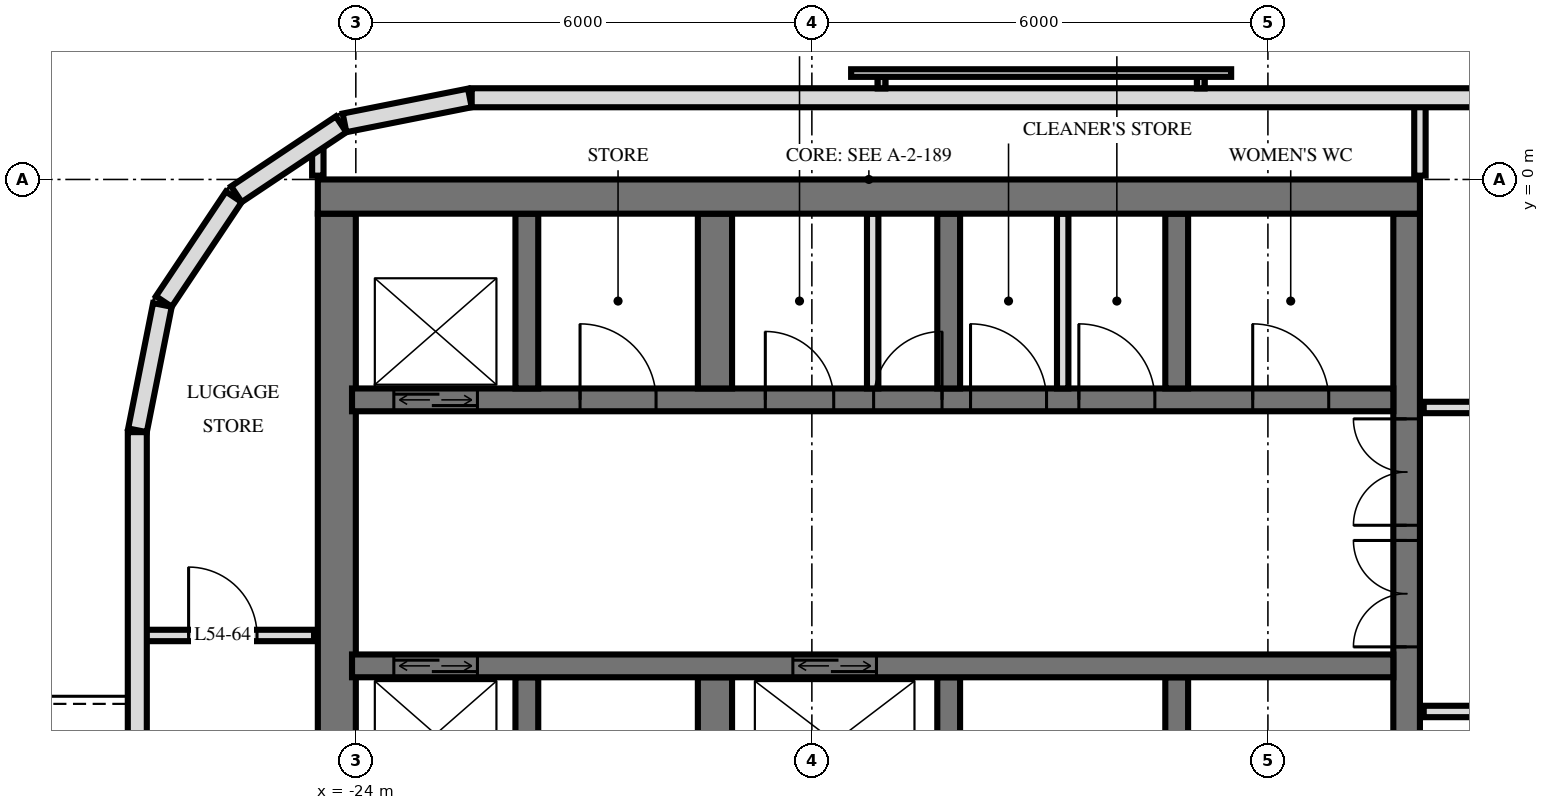
"""IFC4 building model, lengths in metres.
Left out: names, types, materials, properties, quantities, classifications, styles, units other than length and angle.
Written with IfcOpenShell. Run it as: python <this file> out.ifc"""

import sys

from ifc_helpers import new_model, si_unit, direction, frame, frame_2d, origin, place, context, subcontext, project, spatial, rectangle, extrude, element, fill, save


model = new_model("IFC4")
c1 = context("Model", 3, precision=1e-05, world=origin(), true_north=direction((0.0, 1.0)))
c2 = subcontext(c1, "Body", "Model", "MODEL_VIEW")
j1 = project(units=[si_unit("LENGTHUNIT", "METRE"), si_unit("PLANEANGLEUNIT", "RADIAN")], contexts=[c1])
p1 = place(None, origin())
s1 = spatial("IfcSite", under=j1, at=p1, CompositionType="ELEMENT")
p2 = place(p1, origin())
s2 = spatial("IfcBuilding", under=s1, at=p2, CompositionType="ELEMENT")
p3 = place(p2, frame((0.0, 0.0, 208.1)))
s3 = spatial("IfcBuildingStorey", under=s2, at=p3, CompositionType="ELEMENT", Elevation=208.1)
p4 = place(p3, frame((-24.5, -0.225, 0.0), z_axis=(0.0, 0.0, 1.0), x_axis=(1.0, 0.0, 0.0)))
e1 = element("IfcWall", 1, at=p4, inside=s3, PredefinedType="SHEAR", context=c2, shape_type="SweptSolid", body=[
    extrude(rectangle(XDim=14.5, YDim=0.45, at=frame_2d((7.25, 0.0))), origin(), (0.0, 0.0, 1.0), 3.5),
])
p5 = place(p3, frame((-10.175, -14.55, 0.0), z_axis=(0.0, 0.0, 1.0), x_axis=(0.0, 1.0, 0.0)))
e2 = element("IfcWall", 2, at=p5, inside=s3, PredefinedType="SHEAR", context=c2, shape_type="SweptSolid", body=[
    extrude(rectangle(XDim=14.1, YDim=0.35, at=frame_2d((7.05, 0.0))), origin(), (0.0, 0.0, 1.0), 3.5),
])
p6 = place(p5, frame((8.4, 0.0, 0.0)))
e3 = element("IfcOpeningElement", 3, at=p6, cuts=e2, PredefinedType="OPENING", context=c2, shape_type="SweptSolid", body=[
    extrude(rectangle(XDim=1.4, YDim=2.4, at=frame_2d((0.7, 1.2))), frame((0.0, 0.185, 0.0), z_axis=(0.0, -1.0, 0.0), x_axis=(1.0, 0.0, 0.0)), (0.0, 0.0, 1.0), 0.37),
])
p7 = place(p5, frame((10.0, 0.0, 0.0)))
e4 = element("IfcOpeningElement", 4, at=p7, cuts=e2, PredefinedType="OPENING", context=c2, shape_type="SweptSolid", body=[
    extrude(rectangle(XDim=1.4, YDim=2.4, at=frame_2d((0.7, 1.2))), frame((0.0, 0.185, 0.0), z_axis=(0.0, -1.0, 0.0), x_axis=(1.0, 0.0, 0.0)), (0.0, 0.0, 1.0), 0.37),
])
p8 = place(p5, frame((4.0, 0.0, 0.0)))
e5 = element("IfcOpeningElement", 5, at=p8, cuts=e2, PredefinedType="OPENING", context=c2, shape_type="SweptSolid", body=[
    extrude(rectangle(XDim=1.2, YDim=2.1, at=frame_2d((0.6, 1.05))), frame((0.0, 0.185, 0.0), z_axis=(0.0, -1.0, 0.0), x_axis=(1.0, 0.0, 0.0)), (0.0, 0.0, 1.0), 0.37),
])
p9 = place(p3, frame((-24.25, -14.55, 0.0), z_axis=(0.0, 0.0, 1.0), x_axis=(0.0, 1.0, 0.0)))
e6 = element("IfcWall", 6, at=p9, inside=s3, PredefinedType="SHEAR", context=c2, shape_type="SweptSolid", body=[
    extrude(rectangle(XDim=14.1, YDim=0.5, at=frame_2d((7.05, 0.0))), origin(), (0.0, 0.0, 1.0), 3.5),
])
p10 = place(p3, frame((-24.05, -2.9, 0.0), z_axis=(0.0, 0.0, 1.0), x_axis=(1.0, 0.0, 0.0)))
e7 = element("IfcWall", 7, at=p10, inside=s3, PredefinedType="SHEAR", context=c2, shape_type="SweptSolid", body=[
    extrude(rectangle(XDim=13.7, YDim=0.3, at=frame_2d((6.85, 0.0))), origin(), (0.0, 0.0, 1.0), 3.5),
])
p11 = place(p10, frame((0.55, 0.0, 0.0)))
e8 = element("IfcOpeningElement", 8, at=p11, cuts=e7, PredefinedType="OPENING", context=c2, shape_type="SweptSolid", body=[
    extrude(rectangle(XDim=1.1, YDim=2.1, at=frame_2d((0.55, 1.05))), frame((0.0, 0.16, 0.0), z_axis=(0.0, -1.0, 0.0), x_axis=(1.0, 0.0, 0.0)), (0.0, 0.0, 1.0), 0.32),
])
p12 = place(p10, frame((6.863, 0.0, 0.0)))
e9 = element("IfcOpeningElement", 9, at=p12, cuts=e7, PredefinedType="OPENING", context=c2, shape_type="SweptSolid", body=[
    extrude(rectangle(XDim=0.9, YDim=2.1, at=frame_2d((0.45, 1.05))), frame((0.0, 0.16, 0.0), z_axis=(0.0, -1.0, 0.0), x_axis=(1.0, 0.0, 0.0)), (0.0, 0.0, 1.0), 0.32),
])
p13 = place(p10, frame((5.438, 0.0, 0.0)))
e10 = element("IfcOpeningElement", 10, at=p13, cuts=e7, PredefinedType="OPENING", context=c2, shape_type="SweptSolid", body=[
    extrude(rectangle(XDim=0.9, YDim=2.1, at=frame_2d((0.45, 1.05))), frame((0.0, 0.16, 0.0), z_axis=(0.0, -1.0, 0.0), x_axis=(1.0, 0.0, 0.0)), (0.0, 0.0, 1.0), 0.32),
])
p14 = place(p10, frame((11.85, 0.0, 0.0)))
e11 = element("IfcOpeningElement", 11, at=p14, cuts=e7, PredefinedType="OPENING", context=c2, shape_type="SweptSolid", body=[
    extrude(rectangle(XDim=1.0, YDim=2.1, at=frame_2d((0.5, 1.05))), frame((0.0, 0.16, 0.0), z_axis=(0.0, -1.0, 0.0), x_axis=(1.0, 0.0, 0.0)), (0.0, 0.0, 1.0), 0.32),
])
p15 = place(p10, frame((9.562, 0.0, 0.0)))
e12 = element("IfcOpeningElement", 12, at=p15, cuts=e7, PredefinedType="OPENING", context=c2, shape_type="SweptSolid", body=[
    extrude(rectangle(XDim=1.0, YDim=2.1, at=frame_2d((0.5, 1.05))), frame((0.0, 0.16, 0.0), z_axis=(0.0, -1.0, 0.0), x_axis=(1.0, 0.0, 0.0)), (0.0, 0.0, 1.0), 0.32),
])
p16 = place(p10, frame((8.137, 0.0, 0.0)))
e13 = element("IfcOpeningElement", 13, at=p16, cuts=e7, PredefinedType="OPENING", context=c2, shape_type="SweptSolid", body=[
    extrude(rectangle(XDim=1.0, YDim=2.1, at=frame_2d((0.5, 1.05))), frame((0.0, 0.16, 0.0), z_axis=(0.0, -1.0, 0.0), x_axis=(1.0, 0.0, 0.0)), (0.0, 0.0, 1.0), 0.32),
])
p17 = place(p10, frame((3.0, 0.0, 0.0)))
e14 = element("IfcOpeningElement", 14, at=p17, cuts=e7, PredefinedType="OPENING", context=c2, shape_type="SweptSolid", body=[
    extrude(rectangle(XDim=1.0, YDim=2.1, at=frame_2d((0.5, 1.05))), frame((0.0, 0.16, 0.0), z_axis=(0.0, -1.0, 0.0), x_axis=(1.0, 0.0, 0.0)), (0.0, 0.0, 1.0), 0.32),
])
p18 = place(p3, frame((-24.05, -6.4, 0.0), z_axis=(0.0, 0.0, 1.0), x_axis=(1.0, 0.0, 0.0)))
e15 = element("IfcWall", 15, at=p18, inside=s3, PredefinedType="SHEAR", context=c2, shape_type="SweptSolid", body=[
    extrude(rectangle(XDim=13.7, YDim=0.3, at=frame_2d((6.85, 0.0))), origin(), (0.0, 0.0, 1.0), 3.5),
])
p19 = place(p18, frame((0.55, 0.0, 0.0)))
e16 = element("IfcOpeningElement", 16, at=p19, cuts=e15, PredefinedType="OPENING", context=c2, shape_type="SweptSolid", body=[
    extrude(rectangle(XDim=1.1, YDim=2.1, at=frame_2d((0.55, 1.05))), frame((0.0, 0.16, 0.0), z_axis=(0.0, -1.0, 0.0), x_axis=(1.0, 0.0, 0.0)), (0.0, 0.0, 1.0), 0.32),
])
p20 = place(p18, frame((5.8, 0.0, 0.0)))
e17 = element("IfcOpeningElement", 17, at=p20, cuts=e15, PredefinedType="OPENING", context=c2, shape_type="SweptSolid", body=[
    extrude(rectangle(XDim=1.1, YDim=2.1, at=frame_2d((0.55, 1.05))), frame((0.0, 0.16, 0.0), z_axis=(0.0, -1.0, 0.0), x_axis=(1.0, 0.0, 0.0)), (0.0, 0.0, 1.0), 0.32),
])
for number, where, z_axis, x_axis in (
    (18, (-13.2, -2.75, 0.0), (0.0, 0.0, 1.0), (0.0, 1.0, 0.0)),
    (19, (-13.2, -8.85, 0.0), (0.0, 0.0, 1.0), (0.0, 1.0, 0.0)),
    (20, (-16.2, -2.75, 0.0), (0.0, 0.0, 1.0), (0.0, 1.0, 0.0)),
    (21, (-16.2, -8.85, 0.0), (0.0, 0.0, 1.0), (0.0, 1.0, 0.0)),
):
    element("IfcWall", number, at=place(p3, frame(where, z_axis=z_axis, x_axis=x_axis)), inside=s3, PredefinedType="SHEAR", context=c2, shape_type="SweptSolid", body=[
        extrude(rectangle(XDim=2.3, YDim=0.3, at=frame_2d((1.15, 0.0))), origin(), (0.0, 0.0, 1.0), 3.5),
    ])
for number, where, z_axis, x_axis in (
    (22, (-19.275, -2.75, 0.0), (0.0, 0.0, 1.0), (0.0, 1.0, 0.0)),
    (23, (-19.275, -8.85, 0.0), (0.0, 0.0, 1.0), (0.0, 1.0, 0.0)),
):
    element("IfcWall", number, at=place(p3, frame(where, z_axis=z_axis, x_axis=x_axis)), inside=s3, PredefinedType="SHEAR", context=c2, shape_type="SweptSolid", body=[
        extrude(rectangle(XDim=2.3, YDim=0.45, at=frame_2d((1.15, 0.0))), origin(), (0.0, 0.0, 1.0), 3.5),
    ])
for number, where, z_axis, x_axis in (
    (24, (-21.75, -2.75, 0.0), (0.0, 0.0, 1.0), (0.0, 1.0, 0.0)),
    (25, (-21.75, -8.85, 0.0), (0.0, 0.0, 1.0), (0.0, 1.0, 0.0)),
):
    element("IfcWall", number, at=place(p3, frame(where, z_axis=z_axis, x_axis=x_axis)), inside=s3, PredefinedType="SHEAR", context=c2, shape_type="SweptSolid", body=[
        extrude(rectangle(XDim=2.3, YDim=0.3, at=frame_2d((1.15, 0.0))), origin(), (0.0, 0.0, 1.0), 3.5),
    ])
p21 = place(p3, frame((22.475, 1.075, 0.0), z_axis=(0.0, 0.0, 1.0), x_axis=(-1.0, 0.0, 0.0)))
e26 = element("IfcWall", 26, at=p21, inside=s3, PredefinedType="SOLIDWALL", context=c2, shape_type="SweptSolid", body=[
    extrude(rectangle(XDim=44.951, YDim=0.25, at=frame_2d((22.475, 0.0))), origin(), (0.0, 0.0, 1.0), 3.22),
])
p22 = place(p21, frame((18.275, 0.0, 0.9)))
e27 = element("IfcOpeningElement", 27, at=p22, cuts=e26, PredefinedType="OPENING", context=c2, shape_type="SweptSolid", body=[
    extrude(rectangle(XDim=2.4, YDim=1.5, at=frame_2d((1.2, 0.75))), frame((0.0, 0.135, 0.0), z_axis=(0.0, -1.0, 0.0), x_axis=(1.0, 0.0, 0.0)), (0.0, 0.0, 1.0), 0.27),
])
p23 = place(p21, frame((24.275, 0.0, 0.9)))
e28 = element("IfcOpeningElement", 28, at=p23, cuts=e26, PredefinedType="OPENING", context=c2, shape_type="SweptSolid", body=[
    extrude(rectangle(XDim=2.4, YDim=1.5, at=frame_2d((1.2, 0.75))), frame((0.0, 0.135, 0.0), z_axis=(0.0, -1.0, 0.0), x_axis=(1.0, 0.0, 0.0)), (0.0, 0.0, 1.0), 0.27),
])
p24 = place(p21, frame((27.275, 0.0, 0.9)))
e29 = element("IfcOpeningElement", 29, at=p24, cuts=e26, PredefinedType="OPENING", context=c2, shape_type="SweptSolid", body=[
    extrude(rectangle(XDim=2.4, YDim=1.5, at=frame_2d((1.2, 0.75))), frame((0.0, 0.135, 0.0), z_axis=(0.0, -1.0, 0.0), x_axis=(1.0, 0.0, 0.0)), (0.0, 0.0, 1.0), 0.27),
])
p25 = place(p3, frame((-22.5, 1.073, 0.0), z_axis=(0.0, 0.0, 1.0), x_axis=(-0.980803419081, -0.194999110559, 0.0)))
e30 = element("IfcWall", 30, at=p25, inside=s3, PredefinedType="SOLIDWALL", context=c2, shape_type="SweptSolid", body=[
    extrude(rectangle(XDim=1.681, YDim=0.25, at=frame_2d((0.841, 0.0))), origin(), (0.0, 0.0, 1.0), 3.22),
])
for number, where, z_axis, x_axis in (
    (31, (-24.194, 0.726, 0.0), (0.0, 0.0, 1.0), (-0.831, -0.556, 0.0)),
    (32, (-25.606, -0.229, 0.0), (0.0, 0.0, 1.0), (-0.556, -0.831, 0.0)),
):
    element("IfcWall", number, at=place(p3, frame(where, z_axis=z_axis, x_axis=x_axis)), inside=s3, PredefinedType="SOLIDWALL", context=c2, shape_type="SweptSolid", body=[
        extrude(rectangle(XDim=1.656, YDim=0.25, at=frame_2d((0.828, 0.0))), origin(), (0.0, 0.0, 1.0), 3.22),
    ])
p26 = place(p3, frame((-26.545, -1.651, 0.0), z_axis=(0.0, 0.0, 1.0), x_axis=(-0.194999110559, -0.980803419081, 0.0)))
e33 = element("IfcWall", 33, at=p26, inside=s3, PredefinedType="SOLIDWALL", context=c2, shape_type="SweptSolid", body=[
    extrude(rectangle(XDim=1.681, YDim=0.25, at=frame_2d((0.841, 0.0))), origin(), (0.0, 0.0, 1.0), 3.22),
])
p27 = place(p3, frame((-26.875, -3.325, 0.0), z_axis=(0.0, 0.0, 1.0), x_axis=(0.0, -1.0, 0.0)))
e34 = element("IfcWall", 34, at=p27, inside=s3, PredefinedType="SOLIDWALL", context=c2, shape_type="SweptSolid", body=[
    extrude(rectangle(XDim=21.551, YDim=0.25, at=frame_2d((10.775, 0.0))), origin(), (0.0, 0.0, 1.0), 3.22),
])
p28 = place(p27, frame((6.65, 0.0, 0.0)))
e35 = element("IfcOpeningElement", 35, at=p28, cuts=e34, PredefinedType="OPENING", context=c2, shape_type="SweptSolid", body=[
    extrude(rectangle(XDim=1.8, YDim=2.4, at=frame_2d((0.9, 1.2))), frame((0.0, 0.135, 0.0), z_axis=(0.0, -1.0, 0.0), x_axis=(1.0, 0.0, 0.0)), (0.0, 0.0, 1.0), 0.27),
])
p29 = place(p27, frame((12.275, 0.0, 0.9)))
e36 = element("IfcOpeningElement", 36, at=p29, cuts=e34, PredefinedType="OPENING", context=c2, shape_type="SweptSolid", body=[
    extrude(rectangle(XDim=1.2, YDim=1.5, at=frame_2d((0.6, 0.75))), frame((0.0, 0.135, 0.0), z_axis=(0.0, -1.0, 0.0), x_axis=(1.0, 0.0, 0.0)), (0.0, 0.0, 1.0), 0.27),
])
p30 = place(p27, frame((14.675, 0.0, 0.0)))
e37 = element("IfcOpeningElement", 37, at=p30, cuts=e34, PredefinedType="OPENING", context=c2, shape_type="SweptSolid", body=[
    extrude(rectangle(XDim=1.8, YDim=2.4, at=frame_2d((0.9, 1.2))), frame((0.0, 0.135, 0.0), z_axis=(0.0, -1.0, 0.0), x_axis=(1.0, 0.0, 0.0)), (0.0, 0.0, 1.0), 0.27),
])
p31 = place(p27, frame((18.875, 0.0, 0.0)))
e38 = element("IfcOpeningElement", 38, at=p31, cuts=e34, PredefinedType="OPENING", context=c2, shape_type="SweptSolid", body=[
    extrude(rectangle(XDim=1.8, YDim=2.4, at=frame_2d((0.9, 1.2))), frame((0.0, 0.135, 0.0), z_axis=(0.0, -1.0, 0.0), x_axis=(1.0, 0.0, 0.0)), (0.0, 0.0, 1.0), 0.27),
])
for number, where, z_axis, x_axis in (
    (39, (-17.2, -2.75, 0.0), (0.0, 0.0, 1.0), (0.0, 1.0, 0.0)),
    (40, (-14.7, -2.75, 0.0), (0.0, 0.0, 1.0), (0.0, 1.0, 0.0)),
):
    element("IfcWall", number, at=place(p3, frame(where, z_axis=z_axis, x_axis=x_axis)), inside=s3, PredefinedType="PARTITIONING", context=c2, shape_type="SweptSolid", body=[
        extrude(rectangle(XDim=2.3, YDim=0.15, at=frame_2d((1.15, 0.0))), origin(), (0.0, 0.0, 1.0), 3.2),
    ])
p32 = place(p3, frame((-10.0, 0.05, 0.0), z_axis=(0.0, 0.0, 1.0), x_axis=(0.0, 1.0, 0.0)))
e41 = element("IfcWall", 41, at=p32, inside=s3, PredefinedType="PARTITIONING", context=c2, shape_type="SweptSolid", body=[
    extrude(rectangle(XDim=0.97, YDim=0.15, at=frame_2d((0.485, 0.0))), origin(), (0.0, 0.0, 1.0), 3.22),
])
p33 = place(p3, frame((-24.5, 0.05, 0.0), z_axis=(0.0, 0.0, 1.0), x_axis=(0.0, 1.0, 0.0)))
e42 = element("IfcWall", 42, at=p33, inside=s3, PredefinedType="PARTITIONING", context=c2, shape_type="SweptSolid", body=[
    extrude(rectangle(XDim=0.405, YDim=0.15, at=frame_2d((0.203, 0.0))), origin(), (0.0, 0.0, 1.0), 3.22),
])
p34 = place(p3, frame((-9.95, -7.0, 0.0), z_axis=(0.0, 0.0, 1.0), x_axis=(1.0, 0.0, 0.0)))
e43 = element("IfcWall", 43, at=p34, inside=s3, PredefinedType="PARTITIONING", context=c2, shape_type="SweptSolid", body=[
    extrude(rectangle(XDim=19.9, YDim=0.15, at=frame_2d((9.95, 0.0))), origin(), (0.0, 0.0, 1.0), 3.22),
])
p35 = place(p34, frame((9.45, 0.0, 0.0)))
e44 = element("IfcOpeningElement", 44, at=p35, cuts=e43, PredefinedType="OPENING", context=c2, shape_type="SweptSolid", body=[
    extrude(rectangle(XDim=1.0, YDim=2.1, at=frame_2d((0.5, 1.05))), frame((0.0, 0.085, 0.0), z_axis=(0.0, -1.0, 0.0), x_axis=(1.0, 0.0, 0.0)), (0.0, 0.0, 1.0), 0.17),
])
p36 = place(p34, frame((3.45, 0.0, 0.0)))
e45 = element("IfcOpeningElement", 45, at=p36, cuts=e43, PredefinedType="OPENING", context=c2, shape_type="SweptSolid", body=[
    extrude(rectangle(XDim=1.0, YDim=2.1, at=frame_2d((0.5, 1.05))), frame((0.0, 0.085, 0.0), z_axis=(0.0, -1.0, 0.0), x_axis=(1.0, 0.0, 0.0)), (0.0, 0.0, 1.0), 0.17),
])
p37 = place(p3, frame((-26.82, -6.0, 0.0), z_axis=(0.0, 0.0, 1.0), x_axis=(1.0, 0.0, 0.0)))
e46 = element("IfcWall", 46, at=p37, inside=s3, PredefinedType="PARTITIONING", context=c2, shape_type="SweptSolid", body=[
    extrude(rectangle(XDim=2.27, YDim=0.15, at=frame_2d((1.135, 0.0))), origin(), (0.0, 0.0, 1.0), 3.22),
])
p38 = place(p37, frame((0.62, 0.0, 0.0)))
e47 = element("IfcOpeningElement", 47, at=p38, cuts=e46, PredefinedType="OPENING", context=c2, shape_type="SweptSolid", body=[
    extrude(rectangle(XDim=0.9, YDim=2.1, at=frame_2d((0.45, 1.05))), frame((0.0, 0.085, 0.0), z_axis=(0.0, -1.0, 0.0), x_axis=(1.0, 0.0, 0.0)), (0.0, 0.0, 1.0), 0.17),
])
p39 = place(p3, frame((-9.95, -3.0, 0.0), z_axis=(0.0, 0.0, 1.0), x_axis=(1.0, 0.0, 0.0)))
e48 = element("IfcWall", 48, at=p39, inside=s3, PredefinedType="PARTITIONING", context=c2, shape_type="SweptSolid", body=[
    extrude(rectangle(XDim=19.9, YDim=0.15, at=frame_2d((9.95, 0.0))), origin(), (0.0, 0.0, 1.0), 3.22),
])
p40 = place(p39, frame((4.2, 0.0, 0.0)))
e49 = element("IfcOpeningElement", 49, at=p40, cuts=e48, PredefinedType="OPENING", context=c2, shape_type="SweptSolid", body=[
    extrude(rectangle(XDim=1.0, YDim=2.1, at=frame_2d((0.5, 1.05))), frame((0.0, 0.085, 0.0), z_axis=(0.0, -1.0, 0.0), x_axis=(1.0, 0.0, 0.0)), (0.0, 0.0, 1.0), 0.17),
])
p41 = place(p39, frame((11.45, 0.0, 0.0)))
e50 = element("IfcOpeningElement", 50, at=p41, cuts=e48, PredefinedType="OPENING", context=c2, shape_type="SweptSolid", body=[
    extrude(rectangle(XDim=1.0, YDim=2.1, at=frame_2d((0.5, 1.05))), frame((0.0, 0.085, 0.0), z_axis=(0.0, -1.0, 0.0), x_axis=(1.0, 0.0, 0.0)), (0.0, 0.0, 1.0), 0.17),
])
p42 = place(p39, frame((15.45, 0.0, 0.0)))
e51 = element("IfcOpeningElement", 51, at=p42, cuts=e48, PredefinedType="OPENING", context=c2, shape_type="SweptSolid", body=[
    extrude(rectangle(XDim=1.0, YDim=2.1, at=frame_2d((0.5, 1.05))), frame((0.0, 0.085, 0.0), z_axis=(0.0, -1.0, 0.0), x_axis=(1.0, 0.0, 0.0)), (0.0, 0.0, 1.0), 0.17),
])
p43 = place(p39, frame((18.2, 0.0, 0.0)))
e52 = element("IfcOpeningElement", 52, at=p43, cuts=e48, PredefinedType="OPENING", context=c2, shape_type="SweptSolid", body=[
    extrude(rectangle(XDim=1.0, YDim=2.1, at=frame_2d((0.5, 1.05))), frame((0.0, 0.085, 0.0), z_axis=(0.0, -1.0, 0.0), x_axis=(1.0, 0.0, 0.0)), (0.0, 0.0, 1.0), 0.17),
])
p44 = place(p11, origin())
e53 = element("IfcDoor", 53, at=p44, inside=s3, OperationType="DOUBLE_DOOR_SLIDING", PredefinedType="USERDEFINED", context=c2, shape_type="SweptSolid", body=[
    extrude(rectangle(XDim=1.1, YDim=2.1, at=frame_2d((0.55, 1.05))), frame((0.0, 0.025, 0.0), z_axis=(0.0, -1.0, 0.0), x_axis=(1.0, 0.0, 0.0)), (0.0, 0.0, 1.0), 0.05),
])
fill(e8, e53)
p45 = place(p19, origin())
e54 = element("IfcDoor", 54, at=p45, inside=s3, OperationType="DOUBLE_DOOR_SLIDING", PredefinedType="USERDEFINED", context=c2, shape_type="SweptSolid", body=[
    extrude(rectangle(XDim=1.1, YDim=2.1, at=frame_2d((0.55, 1.05))), frame((0.0, 0.025, 0.0), z_axis=(0.0, -1.0, 0.0), x_axis=(1.0, 0.0, 0.0)), (0.0, 0.0, 1.0), 0.05),
])
fill(e16, e54)
p46 = place(p20, origin())
e55 = element("IfcDoor", 55, at=p46, inside=s3, OperationType="DOUBLE_DOOR_SLIDING", PredefinedType="USERDEFINED", context=c2, shape_type="SweptSolid", body=[
    extrude(rectangle(XDim=1.1, YDim=2.1, at=frame_2d((0.55, 1.05))), frame((0.0, 0.025, 0.0), z_axis=(0.0, -1.0, 0.0), x_axis=(1.0, 0.0, 0.0)), (0.0, 0.0, 1.0), 0.05),
])
fill(e17, e55)
p47 = place(p6, origin())
e56 = element("IfcDoor", 56, at=p47, inside=s3, OperationType="DOUBLE_DOOR_SINGLE_SWING", PredefinedType="DOOR", context=c2, shape_type="SweptSolid", body=[
    extrude(rectangle(XDim=1.4, YDim=2.4, at=frame_2d((0.7, 1.2))), frame((0.0, 0.025, 0.0), z_axis=(0.0, -1.0, 0.0), x_axis=(1.0, 0.0, 0.0)), (0.0, 0.0, 1.0), 0.05),
])
fill(e3, e56)
p48 = place(p7, origin())
e57 = element("IfcDoor", 57, at=p48, inside=s3, OperationType="DOUBLE_DOOR_SINGLE_SWING", PredefinedType="DOOR", context=c2, shape_type="SweptSolid", body=[
    extrude(rectangle(XDim=1.4, YDim=2.4, at=frame_2d((0.7, 1.2))), frame((0.0, 0.025, 0.0), z_axis=(0.0, -1.0, 0.0), x_axis=(1.0, 0.0, 0.0)), (0.0, 0.0, 1.0), 0.05),
])
fill(e4, e57)
p49 = place(p12, origin())
e58 = element("IfcDoor", 58, at=p49, inside=s3, OperationType="SINGLE_SWING_LEFT", PredefinedType="DOOR", context=c2, shape_type="SweptSolid", body=[
    extrude(rectangle(XDim=0.9, YDim=2.1, at=frame_2d((0.45, 1.05))), frame((0.0, 0.025, 0.0), z_axis=(0.0, -1.0, 0.0), x_axis=(1.0, 0.0, 0.0)), (0.0, 0.0, 1.0), 0.05),
])
fill(e9, e58)
p50 = place(p13, origin())
e59 = element("IfcDoor", 59, at=p50, inside=s3, OperationType="SINGLE_SWING_RIGHT", PredefinedType="DOOR", context=c2, shape_type="SweptSolid", body=[
    extrude(rectangle(XDim=0.9, YDim=2.1, at=frame_2d((0.45, 1.05))), frame((0.0, 0.025, 0.0), z_axis=(0.0, -1.0, 0.0), x_axis=(1.0, 0.0, 0.0)), (0.0, 0.0, 1.0), 0.05),
])
fill(e10, e59)
p51 = place(p14, origin())
e60 = element("IfcDoor", 60, at=p51, inside=s3, OperationType="SINGLE_SWING_RIGHT", PredefinedType="DOOR", context=c2, shape_type="SweptSolid", body=[
    extrude(rectangle(XDim=1.0, YDim=2.1, at=frame_2d((0.5, 1.05))), frame((0.0, 0.025, 0.0), z_axis=(0.0, -1.0, 0.0), x_axis=(1.0, 0.0, 0.0)), (0.0, 0.0, 1.0), 0.05),
])
fill(e11, e60)
p52 = place(p15, origin())
e61 = element("IfcDoor", 61, at=p52, inside=s3, OperationType="SINGLE_SWING_RIGHT", PredefinedType="DOOR", context=c2, shape_type="SweptSolid", body=[
    extrude(rectangle(XDim=1.0, YDim=2.1, at=frame_2d((0.5, 1.05))), frame((0.0, 0.025, 0.0), z_axis=(0.0, -1.0, 0.0), x_axis=(1.0, 0.0, 0.0)), (0.0, 0.0, 1.0), 0.05),
])
fill(e12, e61)
p53 = place(p16, origin())
e62 = element("IfcDoor", 62, at=p53, inside=s3, OperationType="SINGLE_SWING_RIGHT", PredefinedType="DOOR", context=c2, shape_type="SweptSolid", body=[
    extrude(rectangle(XDim=1.0, YDim=2.1, at=frame_2d((0.5, 1.05))), frame((0.0, 0.025, 0.0), z_axis=(0.0, -1.0, 0.0), x_axis=(1.0, 0.0, 0.0)), (0.0, 0.0, 1.0), 0.05),
])
fill(e13, e62)
p54 = place(p17, origin())
e63 = element("IfcDoor", 63, at=p54, inside=s3, OperationType="SINGLE_SWING_RIGHT", PredefinedType="DOOR", context=c2, shape_type="SweptSolid", body=[
    extrude(rectangle(XDim=1.0, YDim=2.1, at=frame_2d((0.5, 1.05))), frame((0.0, 0.025, 0.0), z_axis=(0.0, -1.0, 0.0), x_axis=(1.0, 0.0, 0.0)), (0.0, 0.0, 1.0), 0.05),
])
fill(e14, e63)
p55 = place(p38, origin())
e64 = element("IfcDoor", 64, at=p55, inside=s3, OperationType="SINGLE_SWING_RIGHT", PredefinedType="DOOR", context=c2, shape_type="SweptSolid", body=[
    extrude(rectangle(XDim=0.9, YDim=2.1, at=frame_2d((0.45, 1.05))), frame((0.0, 0.025, 0.0), z_axis=(0.0, -1.0, 0.0), x_axis=(1.0, 0.0, 0.0)), (0.0, 0.0, 1.0), 0.05),
])
fill(e47, e64)
save(model, sys.argv[1])
